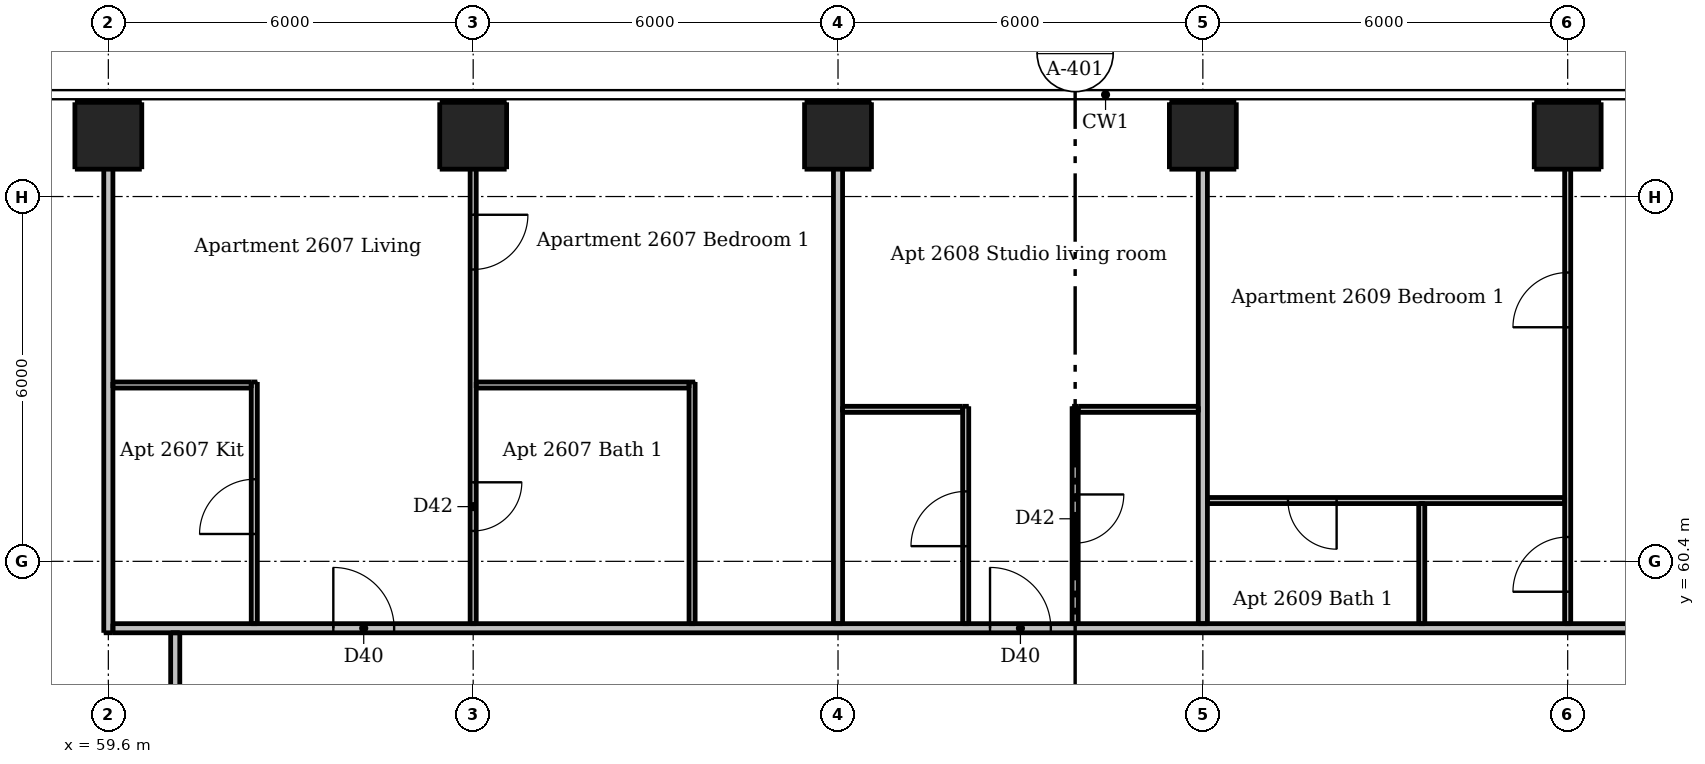
"""IFC4 building model, lengths in metres.
Left out: names, types, materials, properties, quantities, classifications, styles, units other than length and angle.
Written with IfcOpenShell. Run it as: python <this file> out.ifc"""

import sys

from ifc_helpers import new_model, si_unit, direction, frame, frame_2d, origin, origin_2d, place, context, subcontext, project, spatial, rectangle, extrude, element, fill, save


model = new_model("IFC4")
c1 = context("Model", 3, precision=1e-05, world=origin(), true_north=direction((0.0, 1.0)))
c2 = subcontext(c1, "Body", "Model", "MODEL_VIEW")
j1 = project(units=[si_unit("LENGTHUNIT", "METRE"), si_unit("PLANEANGLEUNIT", "RADIAN")], contexts=[c1])
p1 = place(None, origin())
s1 = spatial("IfcSite", under=j1, at=p1, CompositionType="ELEMENT")
p2 = place(p1, origin())
s2 = spatial("IfcBuilding", under=s1, at=p2, CompositionType="ELEMENT")
p3 = place(p2, frame((0.0, 0.0, 98.5)))
s3 = spatial("IfcBuildingStorey", under=s2, at=p3, CompositionType="ELEMENT", Elevation=98.5)
for number, where, z_axis, x_axis in (
    (1, (59.6, 67.4, 0.0), (0.0, 0.0, 1.0), (1.0, 0.0, 0.0)),
    (2, (65.6, 67.4, 0.0), (0.0, 0.0, 1.0), (1.0, 0.0, 0.0)),
    (3, (71.6, 67.4, 0.0), (0.0, 0.0, 1.0), (1.0, 0.0, 0.0)),
    (4, (77.6, 67.4, 0.0), (0.0, 0.0, 1.0), (1.0, 0.0, 0.0)),
    (5, (83.6, 67.4, 0.0), (0.0, 0.0, 1.0), (1.0, 0.0, 0.0)),
):
    element("IfcColumn", number, at=place(p3, frame(where, z_axis=z_axis, x_axis=x_axis)), inside=s3, PredefinedType="COLUMN", context=c2, shape_type="SweptSolid", body=[
        extrude(rectangle(XDim=1.1, YDim=1.1, at=origin_2d()), origin(), (0.0, 0.0, 1.0), 3.05),
    ])
p4 = place(p3, frame((62.0, 59.375, 0.0), z_axis=(0.0, 0.0, 1.0), x_axis=(0.0, 1.0, 0.0)))
e6 = element("IfcWall", 6, at=p4, inside=s3, PredefinedType="PARTITIONING", context=c2, shape_type="SweptSolid", body=[
    extrude(rectangle(XDim=3.975, YDim=0.1, at=frame_2d((1.988, 0.0))), origin(), (0.0, 0.0, 1.0), 3.05),
])
p5 = place(p4, frame((1.475, 0.0, 0.0)))
e7 = element("IfcOpeningElement", 7, at=p5, cuts=e6, PredefinedType="OPENING", context=c2, shape_type="SweptSolid", body=[
    extrude(rectangle(XDim=0.9, YDim=2.1, at=frame_2d((0.45, 1.05))), frame((0.0, 0.06, 0.0), z_axis=(0.0, -1.0, 0.0), x_axis=(1.0, 0.0, 0.0)), (0.0, 0.0, 1.0), 0.12),
])
p6 = place(p3, frame((65.6, 68.0, 0.0), z_axis=(0.0, 0.0, 1.0), x_axis=(0.0, -1.0, 0.0)))
e8 = element("IfcWall", 8, at=p6, inside=s3, PredefinedType="PARTITIONING", context=c2, shape_type="SweptSolid", body=[
    extrude(rectangle(XDim=8.625, YDim=0.1, at=frame_2d((4.312, 0.0))), origin(), (0.0, 0.0, 1.0), 2.516),
])
p7 = place(p6, frame((1.9, 0.0, 0.0)))
e9 = element("IfcOpeningElement", 9, at=p7, cuts=e8, PredefinedType="OPENING", context=c2, shape_type="SweptSolid", body=[
    extrude(rectangle(XDim=0.9, YDim=2.1, at=frame_2d((0.45, 1.05))), frame((0.0, 0.06, 0.0), z_axis=(0.0, -1.0, 0.0), x_axis=(1.0, 0.0, 0.0)), (0.0, 0.0, 1.0), 0.12),
])
p8 = place(p6, frame((6.3, 0.0, 0.0)))
e10 = element("IfcOpeningElement", 10, at=p8, cuts=e8, PredefinedType="OPENING", context=c2, shape_type="SweptSolid", body=[
    extrude(rectangle(XDim=0.8, YDim=2.1, at=frame_2d((0.4, 1.05))), frame((0.0, 0.06, 0.0), z_axis=(0.0, -1.0, 0.0), x_axis=(1.0, 0.0, 0.0)), (0.0, 0.0, 1.0), 0.12),
])
p9 = place(p3, frame((69.2, 59.375, 0.0), z_axis=(0.0, 0.0, 1.0), x_axis=(0.0, 1.0, 0.0)))
e11 = element("IfcWall", 11, at=p9, inside=s3, PredefinedType="PARTITIONING", context=c2, shape_type="SweptSolid", body=[
    extrude(rectangle(XDim=3.975, YDim=0.1, at=frame_2d((1.988, 0.0))), origin(), (0.0, 0.0, 1.0), 3.05),
])
p10 = place(p3, frame((73.7, 59.375, 0.0), z_axis=(0.0, 0.0, 1.0), x_axis=(0.0, 1.0, 0.0)))
e12 = element("IfcWall", 12, at=p10, inside=s3, PredefinedType="PARTITIONING", context=c2, shape_type="SweptSolid", body=[
    extrude(rectangle(XDim=3.575, YDim=0.1, at=frame_2d((1.788, 0.0))), origin(), (0.0, 0.0, 1.0), 3.05),
])
p11 = place(p10, frame((1.275, 0.0, 0.0)))
e13 = element("IfcOpeningElement", 13, at=p11, cuts=e12, PredefinedType="OPENING", context=c2, shape_type="SweptSolid", body=[
    extrude(rectangle(XDim=0.9, YDim=2.1, at=frame_2d((0.45, 1.05))), frame((0.0, 0.06, 0.0), z_axis=(0.0, -1.0, 0.0), x_axis=(1.0, 0.0, 0.0)), (0.0, 0.0, 1.0), 0.12),
])
p12 = place(p3, frame((75.5, 62.95, 0.0), z_axis=(0.0, 0.0, 1.0), x_axis=(0.0, -1.0, 0.0)))
e14 = element("IfcWall", 14, at=p12, inside=s3, PredefinedType="PARTITIONING", context=c2, shape_type="SweptSolid", body=[
    extrude(rectangle(XDim=3.575, YDim=0.1, at=frame_2d((1.788, 0.0))), origin(), (0.0, 0.0, 1.0), 3.05),
])
p13 = place(p12, frame((1.45, 0.0, 0.0)))
e15 = element("IfcOpeningElement", 15, at=p13, cuts=e14, PredefinedType="OPENING", context=c2, shape_type="SweptSolid", body=[
    extrude(rectangle(XDim=0.8, YDim=2.1, at=frame_2d((0.4, 1.05))), frame((0.0, 0.06, 0.0), z_axis=(0.0, -1.0, 0.0), x_axis=(1.0, 0.0, 0.0)), (0.0, 0.0, 1.0), 0.12),
])
p14 = place(p3, frame((81.2, 59.375, 0.0), z_axis=(0.0, 0.0, 1.0), x_axis=(0.0, 1.0, 0.0)))
e16 = element("IfcWall", 16, at=p14, inside=s3, PredefinedType="PARTITIONING", context=c2, shape_type="SweptSolid", body=[
    extrude(rectangle(XDim=1.975, YDim=0.1, at=frame_2d((0.988, 0.0))), origin(), (0.0, 0.0, 1.0), 3.05),
])
p15 = place(p3, frame((83.6, 59.375, 0.0), z_axis=(0.0, 0.0, 1.0), x_axis=(0.0, 1.0, 0.0)))
e17 = element("IfcWall", 17, at=p15, inside=s3, PredefinedType="PARTITIONING", context=c2, shape_type="SweptSolid", body=[
    extrude(rectangle(XDim=8.625, YDim=0.1, at=frame_2d((4.312, 0.0))), origin(), (0.0, 0.0, 1.0), 2.516),
])
p16 = place(p15, frame((0.525, 0.0, 0.0)))
e18 = element("IfcOpeningElement", 18, at=p16, cuts=e17, PredefinedType="OPENING", context=c2, shape_type="SweptSolid", body=[
    extrude(rectangle(XDim=0.9, YDim=2.1, at=frame_2d((0.45, 1.05))), frame((0.0, 0.06, 0.0), z_axis=(0.0, -1.0, 0.0), x_axis=(1.0, 0.0, 0.0)), (0.0, 0.0, 1.0), 0.12),
])
p17 = place(p15, frame((4.875, 0.0, 0.0)))
e19 = element("IfcOpeningElement", 19, at=p17, cuts=e17, PredefinedType="OPENING", context=c2, shape_type="SweptSolid", body=[
    extrude(rectangle(XDim=0.9, YDim=2.1, at=frame_2d((0.45, 1.05))), frame((0.0, 0.06, 0.0), z_axis=(0.0, -1.0, 0.0), x_axis=(1.0, 0.0, 0.0)), (0.0, 0.0, 1.0), 0.12),
])
p18 = place(p3, frame((59.675, 63.3, 0.0), z_axis=(0.0, 0.0, 1.0), x_axis=(1.0, 0.0, 0.0)))
e20 = element("IfcWall", 20, at=p18, inside=s3, PredefinedType="PARTITIONING", context=c2, shape_type="SweptSolid", body=[
    extrude(rectangle(XDim=2.275, YDim=0.1, at=frame_2d((1.137, 0.0))), origin(), (0.0, 0.0, 1.0), 3.05),
])
p19 = place(p3, frame((65.65, 63.3, 0.0), z_axis=(0.0, 0.0, 1.0), x_axis=(1.0, 0.0, 0.0)))
e21 = element("IfcWall", 21, at=p19, inside=s3, PredefinedType="PARTITIONING", context=c2, shape_type="SweptSolid", body=[
    extrude(rectangle(XDim=3.5, YDim=0.1, at=frame_2d((1.75, 0.0))), origin(), (0.0, 0.0, 1.0), 3.05),
])
for number, where, z_axis, x_axis in (
    (22, (71.675, 62.9, 0.0), (0.0, 0.0, 1.0), (1.0, 0.0, 0.0)),
    (23, (75.55, 62.9, 0.0), (0.0, 0.0, 1.0), (1.0, 0.0, 0.0)),
):
    element("IfcWall", number, at=place(p3, frame(where, z_axis=z_axis, x_axis=x_axis)), inside=s3, PredefinedType="PARTITIONING", context=c2, shape_type="SweptSolid", body=[
        extrude(rectangle(XDim=1.975, YDim=0.1, at=frame_2d((0.987, 0.0))), origin(), (0.0, 0.0, 1.0), 3.05),
    ])
p20 = place(p3, frame((83.55, 61.4, 0.0), z_axis=(0.0, 0.0, 1.0), x_axis=(-1.0, 0.0, 0.0)))
e24 = element("IfcWall", 24, at=p20, inside=s3, PredefinedType="PARTITIONING", context=c2, shape_type="SweptSolid", body=[
    extrude(rectangle(XDim=5.875, YDim=0.1, at=frame_2d((2.938, 0.0))), origin(), (0.0, 0.0, 1.0), 3.05),
])
p21 = place(p20, frame((3.75, 0.0, 0.0)))
e25 = element("IfcOpeningElement", 25, at=p21, cuts=e24, PredefinedType="OPENING", context=c2, shape_type="SweptSolid", body=[
    extrude(rectangle(XDim=0.8, YDim=2.1, at=frame_2d((0.4, 1.05))), frame((0.0, 0.06, 0.0), z_axis=(0.0, -1.0, 0.0), x_axis=(1.0, 0.0, 0.0)), (0.0, 0.0, 1.0), 0.12),
])
p22 = place(p3, frame((59.6, 59.225, 0.0), z_axis=(0.0, 0.0, 1.0), x_axis=(0.0, 1.0, 0.0)))
e26 = element("IfcWall", 26, at=p22, inside=s3, PredefinedType="PARTITIONING", context=c2, shape_type="SweptSolid", body=[
    extrude(rectangle(XDim=8.775, YDim=0.15, at=frame_2d((4.387, 0.0))), origin(), (0.0, 0.0, 1.0), 2.51),
])
p23 = place(p3, frame((60.7, 30.325, 0.0), z_axis=(0.0, 0.0, 1.0), x_axis=(0.0, 1.0, 0.0)))
e27 = element("IfcWall", 27, at=p23, inside=s3, PredefinedType="PARTITIONING", context=c2, shape_type="SweptSolid", body=[
    extrude(rectangle(XDim=28.9, YDim=0.15, at=frame_2d((14.45, 0.0))), origin(), (0.0, 0.0, 1.0), 3.05),
])
p24 = place(p23, frame((2.575, 0.0, 0.0)))
e28 = element("IfcOpeningElement", 28, at=p24, cuts=e27, PredefinedType="OPENING", context=c2, shape_type="SweptSolid", body=[
    extrude(rectangle(XDim=1.0, YDim=2.1, at=frame_2d((0.5, 1.05))), frame((0.0, 0.085, 0.0), z_axis=(0.0, -1.0, 0.0), x_axis=(1.0, 0.0, 0.0)), (0.0, 0.0, 1.0), 0.17),
])
p25 = place(p23, frame((8.575, 0.0, 0.0)))
e29 = element("IfcOpeningElement", 29, at=p25, cuts=e27, PredefinedType="OPENING", context=c2, shape_type="SweptSolid", body=[
    extrude(rectangle(XDim=1.0, YDim=2.1, at=frame_2d((0.5, 1.05))), frame((0.0, 0.085, 0.0), z_axis=(0.0, -1.0, 0.0), x_axis=(1.0, 0.0, 0.0)), (0.0, 0.0, 1.0), 0.17),
])
p26 = place(p23, frame((14.575, 0.0, 0.0)))
e30 = element("IfcOpeningElement", 30, at=p26, cuts=e27, PredefinedType="OPENING", context=c2, shape_type="SweptSolid", body=[
    extrude(rectangle(XDim=1.0, YDim=2.1, at=frame_2d((0.5, 1.05))), frame((0.0, 0.085, 0.0), z_axis=(0.0, -1.0, 0.0), x_axis=(1.0, 0.0, 0.0)), (0.0, 0.0, 1.0), 0.17),
])
p27 = place(p23, frame((26.025, 0.0, 0.0)))
e31 = element("IfcOpeningElement", 31, at=p27, cuts=e27, PredefinedType="OPENING", context=c2, shape_type="SweptSolid", body=[
    extrude(rectangle(XDim=1.0, YDim=2.1, at=frame_2d((0.5, 1.05))), frame((0.0, 0.085, 0.0), z_axis=(0.0, -1.0, 0.0), x_axis=(1.0, 0.0, 0.0)), (0.0, 0.0, 1.0), 0.17),
])
for number, where, z_axis, x_axis in (
    (32, (71.6, 59.375, 0.0), (0.0, 0.0, 1.0), (0.0, 1.0, 0.0)),
    (33, (77.6, 59.375, 0.0), (0.0, 0.0, 1.0), (0.0, 1.0, 0.0)),
):
    element("IfcWall", number, at=place(p3, frame(where, z_axis=z_axis, x_axis=x_axis)), inside=s3, PredefinedType="PARTITIONING", context=c2, shape_type="SweptSolid", body=[
        extrude(rectangle(XDim=8.625, YDim=0.15, at=frame_2d((4.312, 0.0))), origin(), (0.0, 0.0, 1.0), 2.516),
    ])
p28 = place(p3, frame((59.675, 59.3, 0.0), z_axis=(0.0, 0.0, 1.0), x_axis=(1.0, 0.0, 0.0)))
e34 = element("IfcWall", 34, at=p28, inside=s3, PredefinedType="PARTITIONING", context=c2, shape_type="SweptSolid", body=[
    extrude(rectangle(XDim=28.55, YDim=0.15, at=frame_2d((14.275, 0.0))), origin(), (0.0, 0.0, 1.0), 3.05),
])
p29 = place(p28, frame((3.625, 0.0, 0.0)))
e35 = element("IfcOpeningElement", 35, at=p29, cuts=e34, PredefinedType="OPENING", context=c2, shape_type="SweptSolid", body=[
    extrude(rectangle(XDim=1.0, YDim=2.1, at=frame_2d((0.5, 1.05))), frame((0.0, 0.085, 0.0), z_axis=(0.0, -1.0, 0.0), x_axis=(1.0, 0.0, 0.0)), (0.0, 0.0, 1.0), 0.17),
])
p30 = place(p28, frame((14.425, 0.0, 0.0)))
e36 = element("IfcOpeningElement", 36, at=p30, cuts=e34, PredefinedType="OPENING", context=c2, shape_type="SweptSolid", body=[
    extrude(rectangle(XDim=1.0, YDim=2.1, at=frame_2d((0.5, 1.05))), frame((0.0, 0.085, 0.0), z_axis=(0.0, -1.0, 0.0), x_axis=(1.0, 0.0, 0.0)), (0.0, 0.0, 1.0), 0.17),
])
p31 = place(p28, frame((25.775, 0.0, 0.0)))
e37 = element("IfcOpeningElement", 37, at=p31, cuts=e34, PredefinedType="OPENING", context=c2, shape_type="SweptSolid", body=[
    extrude(rectangle(XDim=1.0, YDim=2.1, at=frame_2d((0.5, 1.05))), frame((0.0, 0.085, 0.0), z_axis=(0.0, -1.0, 0.0), x_axis=(1.0, 0.0, 0.0)), (0.0, 0.0, 1.0), 0.17),
])
p32 = place(p29, origin())
e38 = element("IfcDoor", 38, at=p32, inside=s3, OperationType="SINGLE_SWING_LEFT", PredefinedType="DOOR", context=c2, shape_type="SweptSolid", body=[
    extrude(rectangle(XDim=1.0, YDim=2.1, at=frame_2d((0.5, 1.05))), frame((0.0, 0.025, 0.0), z_axis=(0.0, -1.0, 0.0), x_axis=(1.0, 0.0, 0.0)), (0.0, 0.0, 1.0), 0.05),
])
fill(e35, e38)
p33 = place(p5, origin())
e39 = element("IfcDoor", 39, at=p33, inside=s3, OperationType="SINGLE_SWING_LEFT", PredefinedType="DOOR", context=c2, shape_type="SweptSolid", body=[
    extrude(rectangle(XDim=0.9, YDim=2.1, at=frame_2d((0.45, 1.05))), frame((0.0, 0.025, 0.0), z_axis=(0.0, -1.0, 0.0), x_axis=(1.0, 0.0, 0.0)), (0.0, 0.0, 1.0), 0.05),
])
fill(e7, e39)
p34 = place(p7, origin())
e40 = element("IfcDoor", 40, at=p34, inside=s3, OperationType="SINGLE_SWING_LEFT", PredefinedType="DOOR", context=c2, shape_type="SweptSolid", body=[
    extrude(rectangle(XDim=0.9, YDim=2.1, at=frame_2d((0.45, 1.05))), frame((0.0, 0.025, 0.0), z_axis=(0.0, -1.0, 0.0), x_axis=(1.0, 0.0, 0.0)), (0.0, 0.0, 1.0), 0.05),
])
fill(e9, e40)
p35 = place(p8, origin())
e41 = element("IfcDoor", 41, at=p35, inside=s3, OperationType="SINGLE_SWING_LEFT", PredefinedType="DOOR", context=c2, shape_type="SweptSolid", body=[
    extrude(rectangle(XDim=0.8, YDim=2.1, at=frame_2d((0.4, 1.05))), frame((0.0, 0.025, 0.0), z_axis=(0.0, -1.0, 0.0), x_axis=(1.0, 0.0, 0.0)), (0.0, 0.0, 1.0), 0.05),
])
fill(e10, e41)
p36 = place(p30, origin())
e42 = element("IfcDoor", 42, at=p36, inside=s3, OperationType="SINGLE_SWING_LEFT", PredefinedType="DOOR", context=c2, shape_type="SweptSolid", body=[
    extrude(rectangle(XDim=1.0, YDim=2.1, at=frame_2d((0.5, 1.05))), frame((0.0, 0.025, 0.0), z_axis=(0.0, -1.0, 0.0), x_axis=(1.0, 0.0, 0.0)), (0.0, 0.0, 1.0), 0.05),
])
fill(e36, e42)
p37 = place(p11, origin())
e43 = element("IfcDoor", 43, at=p37, inside=s3, OperationType="SINGLE_SWING_LEFT", PredefinedType="DOOR", context=c2, shape_type="SweptSolid", body=[
    extrude(rectangle(XDim=0.9, YDim=2.1, at=frame_2d((0.45, 1.05))), frame((0.0, 0.025, 0.0), z_axis=(0.0, -1.0, 0.0), x_axis=(1.0, 0.0, 0.0)), (0.0, 0.0, 1.0), 0.05),
])
fill(e13, e43)
p38 = place(p13, origin())
e44 = element("IfcDoor", 44, at=p38, inside=s3, OperationType="SINGLE_SWING_LEFT", PredefinedType="DOOR", context=c2, shape_type="SweptSolid", body=[
    extrude(rectangle(XDim=0.8, YDim=2.1, at=frame_2d((0.4, 1.05))), frame((0.0, 0.025, 0.0), z_axis=(0.0, -1.0, 0.0), x_axis=(1.0, 0.0, 0.0)), (0.0, 0.0, 1.0), 0.05),
])
fill(e15, e44)
p39 = place(p16, origin())
e45 = element("IfcDoor", 45, at=p39, inside=s3, OperationType="SINGLE_SWING_LEFT", PredefinedType="DOOR", context=c2, shape_type="SweptSolid", body=[
    extrude(rectangle(XDim=0.9, YDim=2.1, at=frame_2d((0.45, 1.05))), frame((0.0, 0.025, 0.0), z_axis=(0.0, -1.0, 0.0), x_axis=(1.0, 0.0, 0.0)), (0.0, 0.0, 1.0), 0.05),
])
fill(e18, e45)
p40 = place(p17, origin())
e46 = element("IfcDoor", 46, at=p40, inside=s3, OperationType="SINGLE_SWING_LEFT", PredefinedType="DOOR", context=c2, shape_type="SweptSolid", body=[
    extrude(rectangle(XDim=0.9, YDim=2.1, at=frame_2d((0.45, 1.05))), frame((0.0, 0.025, 0.0), z_axis=(0.0, -1.0, 0.0), x_axis=(1.0, 0.0, 0.0)), (0.0, 0.0, 1.0), 0.05),
])
fill(e19, e46)
p41 = place(p21, origin())
e47 = element("IfcDoor", 47, at=p41, inside=s3, OperationType="SINGLE_SWING_LEFT", PredefinedType="DOOR", context=c2, shape_type="SweptSolid", body=[
    extrude(rectangle(XDim=0.8, YDim=2.1, at=frame_2d((0.4, 1.05))), frame((0.0, 0.025, 0.0), z_axis=(0.0, -1.0, 0.0), x_axis=(1.0, 0.0, 0.0)), (0.0, 0.0, 1.0), 0.05),
])
fill(e25, e47)
save(model, sys.argv[1])
